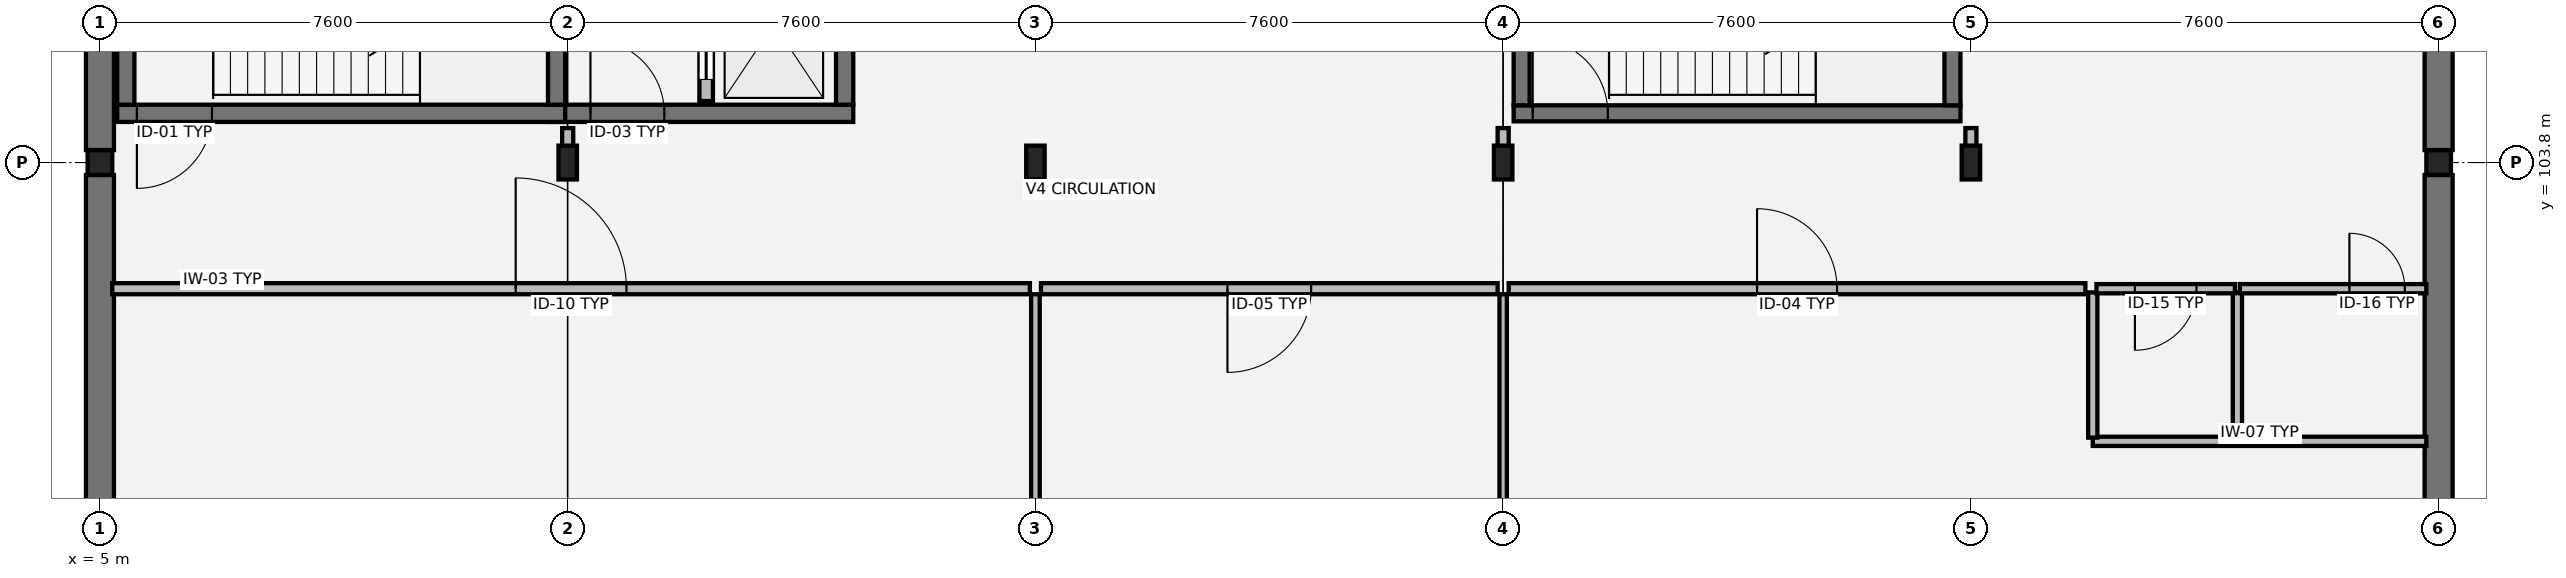
"""IFC4 building model, lengths in metres.
Left out: names, types, materials, properties, quantities, classifications, styles, units other than length and angle.
Written with IfcOpenShell. Run it as: python <this file> out.ifc"""

import sys

from ifc_helpers import new_model, si_unit, direction, frame, frame_2d, origin, origin_2d, place, context, subcontext, project, spatial, rectangle, hollow_rectangle, i_section, extrude, element, fill, save


model = new_model("IFC4")
c1 = context("Model", 3, precision=1e-05, world=origin(), true_north=direction((0.0, 1.0)))
c2 = subcontext(c1, "Body", "Model", "MODEL_VIEW")
j1 = project(units=[si_unit("LENGTHUNIT", "METRE"), si_unit("PLANEANGLEUNIT", "RADIAN")], contexts=[c1])
p1 = place(None, origin())
s1 = spatial("IfcSite", under=j1, at=p1, CompositionType="ELEMENT")
p2 = place(p1, origin())
s2 = spatial("IfcBuilding", under=s1, at=p2, CompositionType="ELEMENT")
p3 = place(p2, frame((0.0, 0.0, -4.42)))
s3 = spatial("IfcBuildingStorey", under=s2, at=p3, CompositionType="ELEMENT", Elevation=-4.42)
p4 = place(p3, frame((5.0, 103.8, 0.0), z_axis=(0.0, 0.0, 1.0), x_axis=(1.0, 0.0, 0.0)))
e1 = element("IfcColumn", 1, at=p4, inside=s3, PredefinedType="COLUMN", context=c2, shape_type="SweptSolid", body=[
    extrude(hollow_rectangle(XDim=0.4, YDim=0.4, WallThickness=0.016, at=origin_2d()), origin(), (0.0, 0.0, 1.0), 4.395),
])
for number, where, z_axis, x_axis in (
    (2, (12.6, 103.8, 0.0), (0.0, 0.0, 1.0), (1.0, 0.0, 0.0)),
    (3, (20.2, 103.8, 0.0), (0.0, 0.0, 1.0), (1.0, 0.0, 0.0)),
    (4, (27.8, 103.8, 0.0), (0.0, 0.0, 1.0), (1.0, 0.0, 0.0)),
    (5, (35.4, 103.8, 0.0), (0.0, 0.0, 1.0), (1.0, 0.0, 0.0)),
):
    element("IfcColumn", number, at=place(p3, frame(where, z_axis=z_axis, x_axis=x_axis)), inside=s3, PredefinedType="COLUMN", context=c2, shape_type="SweptSolid", body=[
        extrude(i_section(OverallWidth=0.3, OverallDepth=0.55, WebThickness=0.015, FlangeThickness=0.029, at=origin_2d()), origin(), (0.0, 0.0, 1.0), 4.395),
    ])
p5 = place(p3, frame((43.0, 103.8, 0.0), z_axis=(0.0, 0.0, 1.0), x_axis=(1.0, 0.0, 0.0)))
e6 = element("IfcColumn", 6, at=p5, inside=s3, PredefinedType="COLUMN", context=c2, shape_type="SweptSolid", body=[
    extrude(hollow_rectangle(XDim=0.4, YDim=0.4, WallThickness=0.016, at=origin_2d()), origin(), (0.0, 0.0, 1.0), 4.395),
])
for number, where, z_axis, x_axis in (
    (7, (5.0, 96.403, 0.0), (0.0, 0.0, 1.0), (0.0, 1.0, 0.0)),
    (8, (43.0, 96.403, 0.0), (0.0, 0.0, 1.0), (0.0, 1.0, 0.0)),
):
    element("IfcWall", number, at=place(p3, frame(where, z_axis=z_axis, x_axis=x_axis)), inside=s3, PredefinedType="USERDEFINED", context=c2, shape_type="SweptSolid", body=[
        extrude(rectangle(XDim=7.194, YDim=0.455, at=frame_2d((3.597, 0.0))), origin(), (0.0, 0.0, 1.0), 3.82),
    ])
for number, where, z_axis, x_axis in (
    (9, (5.0, 104.003, 0.0), (0.0, 0.0, 1.0), (0.0, 1.0, 0.0)),
    (10, (43.0, 104.003, 0.0), (0.0, 0.0, 1.0), (0.0, 1.0, 0.0)),
):
    element("IfcWall", number, at=place(p3, frame(where, z_axis=z_axis, x_axis=x_axis)), inside=s3, PredefinedType="USERDEFINED", context=c2, shape_type="SweptSolid", body=[
        extrude(rectangle(XDim=7.194, YDim=0.455, at=frame_2d((3.597, 0.0))), origin(), (0.0, 0.0, 1.0), 3.82),
    ])
p6 = place(p3, frame((12.28, 104.6, 0.0), z_axis=(0.0, 0.0, 1.0), x_axis=(1.0, 0.0, 0.0)))
e11 = element("IfcWall", 11, at=p6, inside=s3, PredefinedType="SHEAR", context=c2, shape_type="SweptSolid", body=[
    extrude(rectangle(XDim=4.96, YDim=0.28, at=frame_2d((2.48, 0.0))), origin(), (0.0, 0.0, 1.0), 4.185),
])
p7 = place(p6, frame((0.69, 0.0, 0.0)))
e12 = element("IfcOpeningElement", 12, at=p7, cuts=e11, PredefinedType="OPENING", context=c2, shape_type="SweptSolid", body=[
    extrude(rectangle(XDim=1.2, YDim=2.16, at=frame_2d((0.6, 1.08))), frame((0.0, 0.15, 0.0), z_axis=(0.0, -1.0, 0.0), x_axis=(1.0, 0.0, 0.0)), (0.0, 0.0, 1.0), 0.3),
])
p8 = place(p3, frame((17.1, 104.74, 0.0), z_axis=(0.0, 0.0, 1.0), x_axis=(0.0, 1.0, 0.0)))
e13 = element("IfcWall", 13, at=p8, inside=s3, PredefinedType="SHEAR", context=c2, shape_type="SweptSolid", body=[
    extrude(rectangle(XDim=5.72, YDim=0.28, at=frame_2d((2.86, 0.0))), origin(), (0.0, 0.0, 1.0), 4.185),
])
p9 = place(p3, frame((14.85, 104.8, 0.0), z_axis=(0.0, 0.0, 1.0), x_axis=(0.0, 1.0, 0.0)))
e14 = element("IfcWall", 14, at=p9, inside=s3, PredefinedType="SOLIDWALL", context=c2, shape_type="SweptSolid", body=[
    extrude(rectangle(XDim=5.6, YDim=0.22, at=frame_2d((2.8, 0.0))), origin(), (0.0, 0.0, 1.0), 4.185),
])
p10 = place(p9, frame((0.35, 0.0, 0.0)))
e15 = element("IfcOpeningElement", 15, at=p10, cuts=e14, PredefinedType="OPENING", context=c2, shape_type="SweptSolid", body=[
    extrude(rectangle(XDim=1.1, YDim=2.15, at=frame_2d((0.55, 1.075))), frame((0.0, 0.12, 0.0), z_axis=(0.0, -1.0, 0.0), x_axis=(1.0, 0.0, 0.0)), (0.0, 0.0, 1.0), 0.24),
])
p11 = place(p3, frame((5.28, 104.6, 0.0), z_axis=(0.0, 0.0, 1.0), x_axis=(1.0, 0.0, 0.0)))
e16 = element("IfcWall", 16, at=p11, inside=s3, PredefinedType="SHEAR", context=c2, shape_type="SweptSolid", body=[
    extrude(rectangle(XDim=7.28, YDim=0.28, at=frame_2d((3.64, 0.0))), origin(), (0.0, 0.0, 1.0), 4.185),
])
p12 = place(p11, frame((0.32, 0.0, 0.0)))
e17 = element("IfcOpeningElement", 17, at=p12, cuts=e16, PredefinedType="OPENING", context=c2, shape_type="SweptSolid", body=[
    extrude(rectangle(XDim=1.22, YDim=2.18, at=frame_2d((0.61, 1.09))), frame((0.0, 0.15, 0.0), z_axis=(0.0, -1.0, 0.0), x_axis=(1.0, 0.0, 0.0)), (0.0, 0.0, 1.0), 0.3),
])
for number, where, z_axis, x_axis in (
    (18, (5.42, 104.74, 0.0), (0.0, 0.0, 1.0), (0.0, 1.0, 0.0)),
    (19, (12.42, 104.74, 0.0), (0.0, 0.0, 1.0), (0.0, 1.0, 0.0)),
):
    element("IfcWall", number, at=place(p3, frame(where, z_axis=z_axis, x_axis=x_axis)), inside=s3, PredefinedType="SHEAR", context=c2, shape_type="SweptSolid", body=[
        extrude(rectangle(XDim=5.72, YDim=0.28, at=frame_2d((2.86, 0.0))), origin(), (0.0, 0.0, 1.0), 4.185),
    ])
p13 = place(p3, frame((27.97, 104.6, 0.0), z_axis=(0.0, 0.0, 1.0), x_axis=(1.0, 0.0, 0.0)))
e20 = element("IfcWall", 20, at=p13, inside=s3, PredefinedType="SHEAR", context=c2, shape_type="SweptSolid", body=[
    extrude(rectangle(XDim=7.26, YDim=0.26, at=frame_2d((3.63, 0.0))), origin(), (0.0, 0.0, 1.0), 4.185),
])
p14 = place(p13, frame((0.31, 0.0, 0.0)))
e21 = element("IfcOpeningElement", 21, at=p14, cuts=e20, PredefinedType="OPENING", context=c2, shape_type="SweptSolid", body=[
    extrude(rectangle(XDim=1.22, YDim=2.18, at=frame_2d((0.61, 1.09))), frame((0.0, 0.14, 0.0), z_axis=(0.0, -1.0, 0.0), x_axis=(1.0, 0.0, 0.0)), (0.0, 0.0, 1.0), 0.28),
])
for number, where, z_axis, x_axis in (
    (22, (28.1, 104.73, 0.0), (0.0, 0.0, 1.0), (0.0, 1.0, 0.0)),
    (23, (35.1, 104.73, 0.0), (0.0, 0.0, 1.0), (0.0, 1.0, 0.0)),
):
    element("IfcWall", number, at=place(p3, frame(where, z_axis=z_axis, x_axis=x_axis)), inside=s3, PredefinedType="SHEAR", context=c2, shape_type="SweptSolid", body=[
        extrude(rectangle(XDim=5.74, YDim=0.26, at=frame_2d((2.87, 0.0))), origin(), (0.0, 0.0, 1.0), 4.185),
    ])
p15 = place(p3, frame((37.38, 99.27, 0.0), z_axis=(0.0, 0.0, 1.0), x_axis=(1.0, 0.0, 0.0)))
e24 = element("IfcWall", 24, at=p15, inside=s3, PredefinedType="PARTITIONING", context=c2, shape_type="SweptSolid", body=[
    extrude(rectangle(XDim=5.42, YDim=0.15, at=frame_2d((2.71, 0.0))), origin(), (0.0, 0.0, 1.0), 3.52),
])
for number, where, z_axis, x_axis in (
    (25, (37.38, 99.33, 0.0), (0.0, 0.0, 1.0), (0.0, 1.0, 0.0)),
    (26, (39.73, 99.33, 0.0), (0.0, 0.0, 1.0), (0.0, 1.0, 0.0)),
):
    element("IfcWall", number, at=place(p3, frame(where, z_axis=z_axis, x_axis=x_axis)), inside=s3, PredefinedType="PARTITIONING", context=c2, shape_type="SweptSolid", body=[
        extrude(rectangle(XDim=2.36, YDim=0.15, at=frame_2d((1.18, 0.0))), origin(), (0.0, 0.0, 1.0), 3.52),
    ])
p16 = place(p3, frame((37.44, 101.75, 0.0), z_axis=(0.0, 0.0, 1.0), x_axis=(1.0, 0.0, 0.0)))
e27 = element("IfcWall", 27, at=p16, inside=s3, PredefinedType="PARTITIONING", context=c2, shape_type="SweptSolid", body=[
    extrude(rectangle(XDim=2.25, YDim=0.15, at=frame_2d((1.125, 0.0))), origin(), (0.0, 0.0, 1.0), 3.52),
])
p17 = place(p16, frame((0.625, 0.0, 0.0)))
e28 = element("IfcOpeningElement", 28, at=p17, cuts=e27, PredefinedType="OPENING", context=c2, shape_type="SweptSolid", body=[
    extrude(rectangle(XDim=1.0, YDim=2.15, at=frame_2d((0.5, 1.075))), frame((0.0, 0.085, 0.0), z_axis=(0.0, -1.0, 0.0), x_axis=(1.0, 0.0, 0.0)), (0.0, 0.0, 1.0), 0.17),
])
p18 = place(p3, frame((39.77, 101.75, 0.0), z_axis=(0.0, 0.0, 1.0), x_axis=(1.0, 0.0, 0.0)))
e29 = element("IfcWall", 29, at=p18, inside=s3, PredefinedType="PARTITIONING", context=c2, shape_type="SweptSolid", body=[
    extrude(rectangle(XDim=3.03, YDim=0.15, at=frame_2d((1.515, 0.0))), origin(), (0.0, 0.0, 1.0), 3.52),
])
p19 = place(p18, frame((1.78, 0.0, 0.0)))
e30 = element("IfcOpeningElement", 30, at=p19, cuts=e29, PredefinedType="OPENING", context=c2, shape_type="SweptSolid", body=[
    extrude(rectangle(XDim=0.9, YDim=2.15, at=frame_2d((0.45, 1.075))), frame((0.0, 0.085, 0.0), z_axis=(0.0, -1.0, 0.0), x_axis=(1.0, 0.0, 0.0)), (0.0, 0.0, 1.0), 0.17),
])
p20 = place(p3, frame((5.2, 101.75, 0.0), z_axis=(0.0, 0.0, 1.0), x_axis=(1.0, 0.0, 0.0)))
e31 = element("IfcWall", 31, at=p20, inside=s3, PredefinedType="PARTITIONING", context=c2, shape_type="SweptSolid", body=[
    extrude(rectangle(XDim=14.91, YDim=0.18, at=frame_2d((7.455, 0.0))), origin(), (0.0, 0.0, 1.0), 3.52),
])
p21 = place(p20, frame((6.555, 0.0, 0.0)))
e32 = element("IfcOpeningElement", 32, at=p21, cuts=e31, PredefinedType="OPENING", context=c2, shape_type="SweptSolid", body=[
    extrude(rectangle(XDim=1.8, YDim=2.3, at=frame_2d((0.9, 1.15))), frame((0.0, 0.1, 0.0), z_axis=(0.0, -1.0, 0.0), x_axis=(1.0, 0.0, 0.0)), (0.0, 0.0, 1.0), 0.2),
])
p22 = place(p3, frame((20.29, 101.75, 0.0), z_axis=(0.0, 0.0, 1.0), x_axis=(1.0, 0.0, 0.0)))
e33 = element("IfcWall", 33, at=p22, inside=s3, PredefinedType="PARTITIONING", context=c2, shape_type="SweptSolid", body=[
    extrude(rectangle(XDim=7.42, YDim=0.18, at=frame_2d((3.71, 0.0))), origin(), (0.0, 0.0, 1.0), 3.52),
])
p23 = place(p22, frame((3.03, 0.0, 0.0)))
e34 = element("IfcOpeningElement", 34, at=p23, cuts=e33, PredefinedType="OPENING", context=c2, shape_type="SweptSolid", body=[
    extrude(rectangle(XDim=1.36, YDim=2.2, at=frame_2d((0.68, 1.1))), frame((0.0, 0.1, 0.0), z_axis=(0.0, -1.0, 0.0), x_axis=(1.0, 0.0, 0.0)), (0.0, 0.0, 1.0), 0.2),
])
p24 = place(p3, frame((27.89, 101.75, 0.0), z_axis=(0.0, 0.0, 1.0), x_axis=(1.0, 0.0, 0.0)))
e35 = element("IfcWall", 35, at=p24, inside=s3, PredefinedType="PARTITIONING", context=c2, shape_type="SweptSolid", body=[
    extrude(rectangle(XDim=9.37, YDim=0.18, at=frame_2d((4.685, 0.0))), origin(), (0.0, 0.0, 1.0), 3.52),
])
p25 = place(p24, frame((4.035, 0.0, 0.0)))
e36 = element("IfcOpeningElement", 36, at=p25, cuts=e35, PredefinedType="OPENING", context=c2, shape_type="SweptSolid", body=[
    extrude(rectangle(XDim=1.3, YDim=2.2, at=frame_2d((0.65, 1.1))), frame((0.0, 0.1, 0.0), z_axis=(0.0, -1.0, 0.0), x_axis=(1.0, 0.0, 0.0)), (0.0, 0.0, 1.0), 0.2),
])
for number, where, z_axis, x_axis in (
    (37, (12.6, 104.04, 0.0), (0.0, 0.0, 1.0), (0.0, 1.0, 0.0)),
    (38, (27.8, 104.04, 0.0), (0.0, 0.0, 1.0), (0.0, 1.0, 0.0)),
    (39, (35.4, 104.04, 0.0), (0.0, 0.0, 1.0), (0.0, 1.0, 0.0)),
):
    element("IfcWall", number, at=place(p3, frame(where, z_axis=z_axis, x_axis=x_axis)), inside=s3, PredefinedType="PARTITIONING", context=c2, shape_type="SweptSolid", body=[
        extrude(rectangle(XDim=0.32, YDim=0.18, at=frame_2d((0.16, 0.0))), origin(), (0.0, 0.0, 1.0), 3.52),
    ])
p26 = place(p3, frame((20.2, 73.72, 0.0), z_axis=(0.0, 0.0, 1.0), x_axis=(0.0, 1.0, 0.0)))
e40 = element("IfcWall", 40, at=p26, inside=s3, PredefinedType="PARTITIONING", context=c2, shape_type="SweptSolid", body=[
    extrude(rectangle(XDim=27.94, YDim=0.14, at=frame_2d((13.97, 0.0))), origin(), (0.0, 0.0, 1.0), 3.52),
])
p27 = place(p3, frame((27.8, 73.72, 0.0), z_axis=(0.0, 0.0, 1.0), x_axis=(0.0, 1.0, 0.0)))
e41 = element("IfcWall", 41, at=p27, inside=s3, PredefinedType="PARTITIONING", context=c2, shape_type="SweptSolid", body=[
    extrude(rectangle(XDim=27.94, YDim=0.12, at=frame_2d((13.97, 0.0))), origin(), (0.0, 0.0, 1.0), 3.52),
])
p28 = place(p7, origin())
e42 = element("IfcDoor", 42, at=p28, inside=s3, OperationType="SINGLE_SWING_LEFT", PredefinedType="DOOR", context=c2, shape_type="SweptSolid", body=[
    extrude(rectangle(XDim=1.2, YDim=2.16, at=frame_2d((0.6, 1.08))), frame((0.0, 0.025, 0.0), z_axis=(0.0, -1.0, 0.0), x_axis=(1.0, 0.0, 0.0)), (0.0, 0.0, 1.0), 0.05),
])
fill(e12, e42)
p29 = place(p10, origin())
e43 = element("IfcDoor", 43, at=p29, inside=s3, OperationType="SLIDING_TO_LEFT", PredefinedType="DOOR", context=c2, shape_type="SweptSolid", body=[
    extrude(rectangle(XDim=1.1, YDim=2.15, at=frame_2d((0.55, 1.075))), frame((0.0, 0.025, 0.0), z_axis=(0.0, -1.0, 0.0), x_axis=(1.0, 0.0, 0.0)), (0.0, 0.0, 1.0), 0.05),
])
fill(e15, e43)
p30 = place(p12, origin())
e44 = element("IfcDoor", 44, at=p30, inside=s3, OperationType="SINGLE_SWING_RIGHT", PredefinedType="DOOR", context=c2, shape_type="SweptSolid", body=[
    extrude(rectangle(XDim=1.22, YDim=2.18, at=frame_2d((0.61, 1.09))), frame((0.0, 0.025, 0.0), z_axis=(0.0, -1.0, 0.0), x_axis=(1.0, 0.0, 0.0)), (0.0, 0.0, 1.0), 0.05),
])
fill(e17, e44)
p31 = place(p14, origin())
e45 = element("IfcDoor", 45, at=p31, inside=s3, OperationType="SINGLE_SWING_LEFT", PredefinedType="DOOR", context=c2, shape_type="SweptSolid", body=[
    extrude(rectangle(XDim=1.22, YDim=2.18, at=frame_2d((0.61, 1.09))), frame((0.0, 0.025, 0.0), z_axis=(0.0, -1.0, 0.0), x_axis=(1.0, 0.0, 0.0)), (0.0, 0.0, 1.0), 0.05),
])
fill(e21, e45)
p32 = place(p17, origin())
e46 = element("IfcDoor", 46, at=p32, inside=s3, OperationType="SINGLE_SWING_RIGHT", PredefinedType="DOOR", context=c2, shape_type="SweptSolid", body=[
    extrude(rectangle(XDim=1.0, YDim=2.15, at=frame_2d((0.5, 1.075))), frame((0.0, 0.025, 0.0), z_axis=(0.0, -1.0, 0.0), x_axis=(1.0, 0.0, 0.0)), (0.0, 0.0, 1.0), 0.05),
])
fill(e28, e46)
p33 = place(p19, origin())
e47 = element("IfcDoor", 47, at=p33, inside=s3, OperationType="SINGLE_SWING_LEFT", PredefinedType="DOOR", context=c2, shape_type="SweptSolid", body=[
    extrude(rectangle(XDim=0.9, YDim=2.15, at=frame_2d((0.45, 1.075))), frame((0.0, 0.025, 0.0), z_axis=(0.0, -1.0, 0.0), x_axis=(1.0, 0.0, 0.0)), (0.0, 0.0, 1.0), 0.05),
])
fill(e30, e47)
p34 = place(p21, origin())
e48 = element("IfcDoor", 48, at=p34, inside=s3, OperationType="DOUBLE_DOOR_SINGLE_SWING", PredefinedType="DOOR", context=c2, shape_type="SweptSolid", body=[
    extrude(rectangle(XDim=1.8, YDim=2.3, at=frame_2d((0.9, 1.15))), frame((0.0, 0.025, 0.0), z_axis=(0.0, -1.0, 0.0), x_axis=(1.0, 0.0, 0.0)), (0.0, 0.0, 1.0), 0.05),
])
fill(e32, e48)
p35 = place(p23, origin())
e49 = element("IfcDoor", 49, at=p35, inside=s3, OperationType="SINGLE_SWING_RIGHT", PredefinedType="DOOR", context=c2, shape_type="SweptSolid", body=[
    extrude(rectangle(XDim=1.36, YDim=2.2, at=frame_2d((0.68, 1.1))), frame((0.0, 0.025, 0.0), z_axis=(0.0, -1.0, 0.0), x_axis=(1.0, 0.0, 0.0)), (0.0, 0.0, 1.0), 0.05),
])
fill(e34, e49)
p36 = place(p25, origin())
e50 = element("IfcDoor", 50, at=p36, inside=s3, OperationType="SINGLE_SWING_LEFT", PredefinedType="DOOR", context=c2, shape_type="SweptSolid", body=[
    extrude(rectangle(XDim=1.3, YDim=2.2, at=frame_2d((0.65, 1.1))), frame((0.0, 0.025, 0.0), z_axis=(0.0, -1.0, 0.0), x_axis=(1.0, 0.0, 0.0)), (0.0, 0.0, 1.0), 0.05),
])
fill(e36, e50)
save(model, sys.argv[1])
